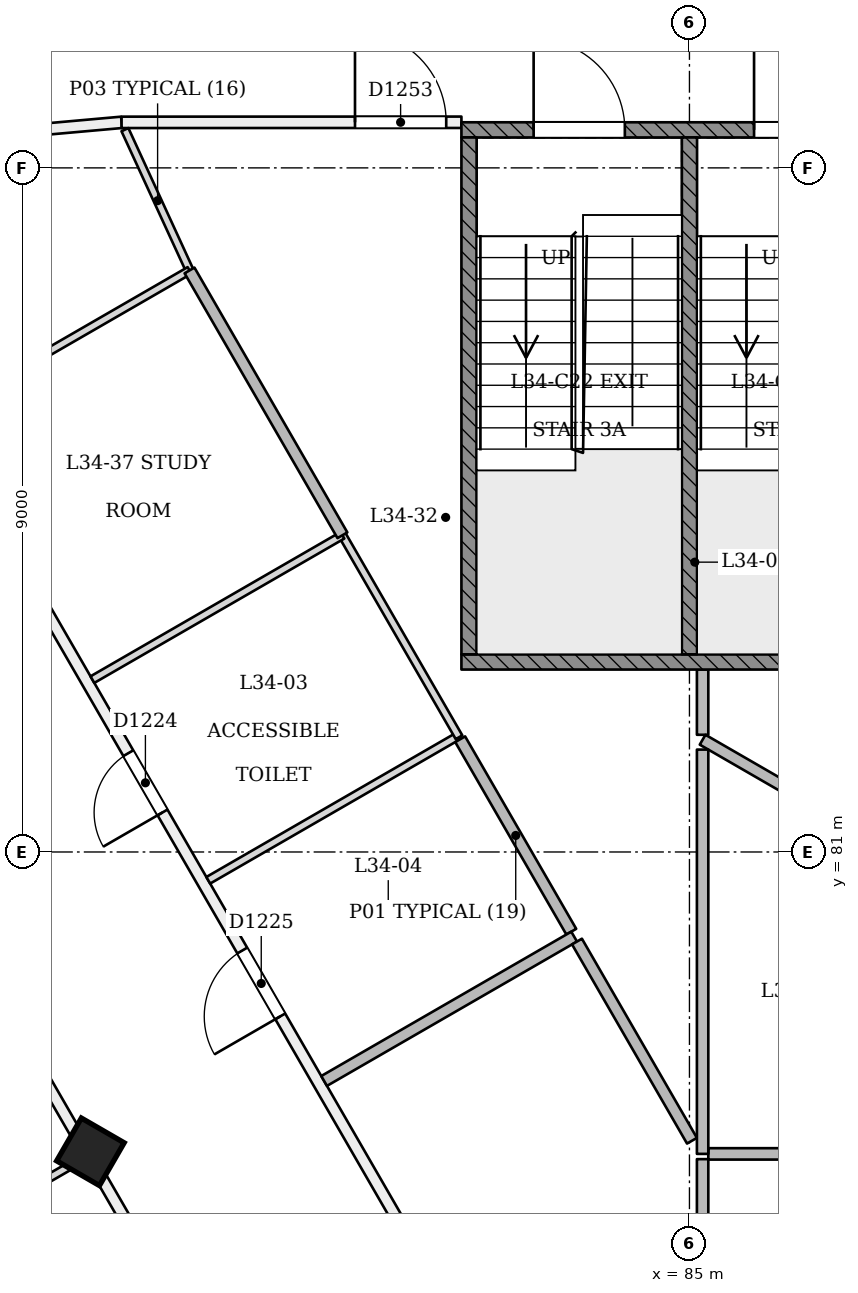
"""IFC4 building model, lengths in metres.
Left out: names, types, materials, properties, quantities, classifications, styles, units other than length and angle.
Written with IfcOpenShell. Run it as: python <this file> out.ifc"""

import sys

from ifc_helpers import new_model, si_unit, direction, frame, frame_2d, origin, origin_2d, place, context, subcontext, project, spatial, rectangle, extrude, element, fill, save


model = new_model("IFC4")
c1 = context("Model", 3, precision=1e-05, world=origin(), true_north=direction((0.0, 1.0)))
c2 = subcontext(c1, "Body", "Model", "MODEL_VIEW")
j1 = project(units=[si_unit("LENGTHUNIT", "METRE"), si_unit("PLANEANGLEUNIT", "RADIAN")], contexts=[c1])
p1 = place(None, origin())
s1 = spatial("IfcSite", under=j1, at=p1, CompositionType="ELEMENT")
p2 = place(p1, origin())
s2 = spatial("IfcBuilding", under=s1, at=p2, CompositionType="ELEMENT")
p3 = place(p2, frame((0.0, 0.0, 135.0)))
s3 = spatial("IfcBuildingStorey", under=s2, at=p3, CompositionType="ELEMENT", Elevation=135.0)
p4 = place(p3, frame((77.092, 77.009, -0.02), z_axis=(0.022221406801, 0.038413224561, 0.999014831351), x_axis=(-0.866021380218, -0.498527772566, 0.0384321348)))
e1 = element("IfcColumn", 1, at=p4, inside=s3, PredefinedType="COLUMN", context=c2, shape_type="SweptSolid", body=[
    extrude(rectangle(XDim=0.65, YDim=0.65, at=origin_2d()), origin(), (0.0, 0.0, 1.0), 3.604),
])
p5 = place(p3, frame((73.173, 90.21, 0.0), z_axis=(0.0, 0.0, 1.0), x_axis=(0.996042384303, 0.088879517729, 0.0)))
e2 = element("IfcWall", 2, at=p5, inside=s3, PredefinedType="PARTITIONING", context=c2, shape_type="SweptSolid", body=[
    extrude(rectangle(XDim=4.373, YDim=0.15, at=frame_2d((2.187, 0.0))), origin(), (0.0, 0.0, 1.0), 3.15),
])
p6 = place(p3, frame((96.944, 90.2, 0.0), z_axis=(0.0, 0.0, 1.0), x_axis=(-0.500002955053, -0.866023697677, 0.0)))
e3 = element("IfcWall", 3, at=p6, inside=s3, PredefinedType="PARTITIONING", context=c2, shape_type="SweptSolid", body=[
    extrude(rectangle(XDim=23.758, YDim=0.15, at=frame_2d((11.879, 0.0))), origin(), (0.0, 0.0, 1.0), 3.15),
])
p7 = place(p6, frame((18.181, 0.0, 0.0)))
e4 = element("IfcOpeningElement", 4, at=p7, cuts=e3, PredefinedType="OPENING", context=c2, shape_type="SweptSolid", body=[
    extrude(rectangle(XDim=1.0, YDim=2.1, at=frame_2d((0.5, 1.05))), frame((0.0, 0.085, 0.0), z_axis=(0.0, -1.0, 0.0), x_axis=(1.0, 0.0, 0.0)), (0.0, 0.0, 1.0), 0.171),
])
p8 = place(p6, frame((9.378, 0.0, 0.0)))
e5 = element("IfcOpeningElement", 5, at=p8, cuts=e3, PredefinedType="OPENING", context=c2, shape_type="SweptSolid", body=[
    extrude(rectangle(XDim=1.0, YDim=2.1, at=frame_2d((0.5, 1.05))), frame((0.0, 0.085, 0.0), z_axis=(0.0, -1.0, 0.0), x_axis=(1.0, 0.0, 0.0)), (0.0, 0.0, 1.0), 0.171),
])
p9 = place(p6, frame((13.859, 0.0, 0.0)))
e6 = element("IfcOpeningElement", 6, at=p9, cuts=e3, PredefinedType="OPENING", context=c2, shape_type="SweptSolid", body=[
    extrude(rectangle(XDim=1.0, YDim=2.1, at=frame_2d((0.5, 1.05))), frame((0.0, 0.085, 0.0), z_axis=(0.0, -1.0, 0.0), x_axis=(1.0, 0.0, 0.0)), (0.0, 0.0, 1.0), 0.171),
])
p10 = place(p6, frame((2.845, 0.0, 0.0)))
e7 = element("IfcOpeningElement", 7, at=p10, cuts=e3, PredefinedType="OPENING", context=c2, shape_type="SweptSolid", body=[
    extrude(rectangle(XDim=1.0, YDim=2.1, at=frame_2d((0.5, 1.05))), frame((0.0, 0.085, 0.0), z_axis=(0.0, -1.0, 0.0), x_axis=(1.0, 0.0, 0.0)), (0.0, 0.0, 1.0), 0.171),
])
p11 = place(p3, frame((64.777, 98.34, 0.0), z_axis=(0.0, 0.0, 1.0), x_axis=(0.499997513821, -0.866026839176, 0.0)))
e8 = element("IfcWall", 8, at=p11, inside=s3, PredefinedType="PARTITIONING", context=c2, shape_type="SweptSolid", body=[
    extrude(rectangle(XDim=40.26, YDim=0.15, at=frame_2d((20.13, 0.0))), origin(), (0.0, 0.0, 1.0), 2.75),
])
p12 = place(p11, frame((0.2, 0.0, 0.0)))
e9 = element("IfcOpeningElement", 9, at=p12, cuts=e8, PredefinedType="OPENING", context=c2, shape_type="SweptSolid", body=[
    extrude(rectangle(XDim=1.2, YDim=2.1, at=frame_2d((0.6, 1.05))), frame((0.0, 0.085, 0.0), z_axis=(0.0, -1.0, 0.0), x_axis=(1.0, 0.0, 0.0)), (0.0, 0.0, 1.0), 0.171),
])
p13 = place(p11, frame((9.525, 0.0, 0.0)))
e10 = element("IfcOpeningElement", 10, at=p13, cuts=e8, PredefinedType="OPENING", context=c2, shape_type="SweptSolid", body=[
    extrude(rectangle(XDim=1.0, YDim=2.1, at=frame_2d((0.5, 1.05))), frame((0.0, 0.085, 0.0), z_axis=(0.0, -1.0, 0.0), x_axis=(1.0, 0.0, 0.0)), (0.0, 0.0, 1.0), 0.171),
])
p14 = place(p11, frame((11.735, 0.0, 0.0)))
e11 = element("IfcOpeningElement", 11, at=p14, cuts=e8, PredefinedType="OPENING", context=c2, shape_type="SweptSolid", body=[
    extrude(rectangle(XDim=1.0, YDim=2.1, at=frame_2d((0.5, 1.05))), frame((0.0, 0.085, 0.0), z_axis=(0.0, -1.0, 0.0), x_axis=(1.0, 0.0, 0.0)), (0.0, 0.0, 1.0), 0.171),
])
p15 = place(p11, frame((19.53, 0.0, 0.0)))
e12 = element("IfcOpeningElement", 12, at=p15, cuts=e8, PredefinedType="OPENING", context=c2, shape_type="SweptSolid", body=[
    extrude(rectangle(XDim=1.2, YDim=2.1, at=frame_2d((0.6, 1.05))), frame((0.0, 0.085, 0.0), z_axis=(0.0, -1.0, 0.0), x_axis=(1.0, 0.0, 0.0)), (0.0, 0.0, 1.0), 0.171),
])
p16 = place(p11, frame((27.41, 0.0, 0.0)))
e13 = element("IfcOpeningElement", 13, at=p16, cuts=e8, PredefinedType="OPENING", context=c2, shape_type="SweptSolid", body=[
    extrude(rectangle(XDim=1.0, YDim=2.1, at=frame_2d((0.5, 1.05))), frame((0.0, 0.085, 0.0), z_axis=(0.0, -1.0, 0.0), x_axis=(1.0, 0.0, 0.0)), (0.0, 0.0, 1.0), 0.171),
])
p17 = place(p11, frame((34.13, 0.0, 0.0)))
e14 = element("IfcOpeningElement", 14, at=p17, cuts=e8, PredefinedType="OPENING", context=c2, shape_type="SweptSolid", body=[
    extrude(rectangle(XDim=1.2, YDim=2.1, at=frame_2d((0.6, 1.05))), frame((0.0, 0.085, 0.0), z_axis=(0.0, -1.0, 0.0), x_axis=(1.0, 0.0, 0.0)), (0.0, 0.0, 1.0), 0.171),
])
p18 = place(p11, frame((38.78, 0.0, 0.0)))
e15 = element("IfcOpeningElement", 15, at=p18, cuts=e8, PredefinedType="OPENING", context=c2, shape_type="SweptSolid", body=[
    extrude(rectangle(XDim=1.0, YDim=2.1, at=frame_2d((0.5, 1.05))), frame((0.0, 0.085, 0.0), z_axis=(0.0, -1.0, 0.0), x_axis=(1.0, 0.0, 0.0)), (0.0, 0.0, 1.0), 0.171),
])
p19 = place(p3, frame((85.093, 63.473, 0.0), z_axis=(0.0, 0.0, 1.0), x_axis=(0.499997513821, 0.866026839176, 0.0)))
e16 = element("IfcWall", 16, at=p19, inside=s3, PredefinedType="PARTITIONING", context=c2, shape_type="SweptSolid", body=[
    extrude(rectangle(XDim=40.26, YDim=0.15, at=frame_2d((20.13, 0.0))), origin(), (0.0, 0.0, 1.0), 2.75),
])
p20 = place(p19, frame((0.429, 0.0, 0.0)))
e17 = element("IfcOpeningElement", 17, at=p20, cuts=e16, PredefinedType="OPENING", context=c2, shape_type="SweptSolid", body=[
    extrude(rectangle(XDim=1.2, YDim=2.1, at=frame_2d((0.6, 1.05))), frame((0.0, 0.085, 0.0), z_axis=(0.0, -1.0, 0.0), x_axis=(1.0, 0.0, 0.0)), (0.0, 0.0, 1.0), 0.171),
])
p21 = place(p19, frame((2.85, 0.0, 0.0)))
e18 = element("IfcOpeningElement", 18, at=p21, cuts=e16, PredefinedType="OPENING", context=c2, shape_type="SweptSolid", body=[
    extrude(rectangle(XDim=1.0, YDim=2.1, at=frame_2d((0.5, 1.05))), frame((0.0, 0.085, 0.0), z_axis=(0.0, -1.0, 0.0), x_axis=(1.0, 0.0, 0.0)), (0.0, 0.0, 1.0), 0.171),
])
p22 = place(p19, frame((8.28, 0.0, 0.0)))
e19 = element("IfcOpeningElement", 19, at=p22, cuts=e16, PredefinedType="OPENING", context=c2, shape_type="SweptSolid", body=[
    extrude(rectangle(XDim=1.2, YDim=2.1, at=frame_2d((0.6, 1.05))), frame((0.0, 0.085, 0.0), z_axis=(0.0, -1.0, 0.0), x_axis=(1.0, 0.0, 0.0)), (0.0, 0.0, 1.0), 0.171),
])
p23 = place(p19, frame((11.735, 0.0, 0.0)))
e20 = element("IfcOpeningElement", 20, at=p23, cuts=e16, PredefinedType="OPENING", context=c2, shape_type="SweptSolid", body=[
    extrude(rectangle(XDim=1.0, YDim=2.1, at=frame_2d((0.5, 1.05))), frame((0.0, 0.085, 0.0), z_axis=(0.0, -1.0, 0.0), x_axis=(1.0, 0.0, 0.0)), (0.0, 0.0, 1.0), 0.171),
])
p24 = place(p19, frame((18.41, 0.0, 0.0)))
e21 = element("IfcOpeningElement", 21, at=p24, cuts=e16, PredefinedType="OPENING", context=c2, shape_type="SweptSolid", body=[
    extrude(rectangle(XDim=1.0, YDim=2.1, at=frame_2d((0.5, 1.05))), frame((0.0, 0.085, 0.0), z_axis=(0.0, -1.0, 0.0), x_axis=(1.0, 0.0, 0.0)), (0.0, 0.0, 1.0), 0.171),
])
p25 = place(p19, frame((20.85, 0.0, 0.0)))
e22 = element("IfcOpeningElement", 22, at=p25, cuts=e16, PredefinedType="OPENING", context=c2, shape_type="SweptSolid", body=[
    extrude(rectangle(XDim=1.0, YDim=2.1, at=frame_2d((0.5, 1.05))), frame((0.0, 0.085, 0.0), z_axis=(0.0, -1.0, 0.0), x_axis=(1.0, 0.0, 0.0)), (0.0, 0.0, 1.0), 0.171),
])
p26 = place(p19, frame((26.38, 0.0, 0.0)))
e23 = element("IfcOpeningElement", 23, at=p26, cuts=e16, PredefinedType="OPENING", context=c2, shape_type="SweptSolid", body=[
    extrude(rectangle(XDim=1.0, YDim=2.1, at=frame_2d((0.5, 1.05))), frame((0.0, 0.085, 0.0), z_axis=(0.0, -1.0, 0.0), x_axis=(1.0, 0.0, 0.0)), (0.0, 0.0, 1.0), 0.171),
])
p27 = place(p19, frame((34.13, 0.0, 0.0)))
e24 = element("IfcOpeningElement", 24, at=p27, cuts=e16, PredefinedType="OPENING", context=c2, shape_type="SweptSolid", body=[
    extrude(rectangle(XDim=1.2, YDim=2.1, at=frame_2d((0.6, 1.05))), frame((0.0, 0.085, 0.0), z_axis=(0.0, -1.0, 0.0), x_axis=(1.0, 0.0, 0.0)), (0.0, 0.0, 1.0), 0.171),
])
p28 = place(p19, frame((38.86, 0.0, 0.0)))
e25 = element("IfcOpeningElement", 25, at=p28, cuts=e16, PredefinedType="OPENING", context=c2, shape_type="SweptSolid", body=[
    extrude(rectangle(XDim=1.2, YDim=2.1, at=frame_2d((0.6, 1.05))), frame((0.0, 0.085, 0.0), z_axis=(0.0, -1.0, 0.0), x_axis=(1.0, 0.0, 0.0)), (0.0, 0.0, 1.0), 0.171),
])
p29 = place(p3, frame((77.529, 90.599, 0.0), z_axis=(0.0, 0.0, 1.0), x_axis=(0.999999976145, 0.000218424065, 0.0)))
e26 = element("IfcWall", 26, at=p29, inside=s3, PredefinedType="PARTITIONING", context=c2, shape_type="SweptSolid", body=[
    extrude(rectangle(XDim=4.471, YDim=0.15, at=frame_2d((2.235, 0.0))), origin(), (0.0, 0.0, 1.0), 3.15),
])
p30 = place(p29, frame((3.071, 0.0, 0.0)))
e27 = element("IfcOpeningElement", 27, at=p30, cuts=e26, PredefinedType="OPENING", context=c2, shape_type="SweptSolid", body=[
    extrude(rectangle(XDim=1.2, YDim=2.1, at=frame_2d((0.6, 1.05))), frame((0.0, 0.085, 0.0), z_axis=(0.0, -1.0, 0.0), x_axis=(1.0, 0.0, 0.0)), (0.0, 0.0, 1.0), 0.171),
])
p31 = place(p3, frame((85.0, 69.513, 0.0), z_axis=(0.0, 0.0, 1.0), x_axis=(-0.500001724231, 0.866024408297, 0.0)))
e28 = element("IfcWall", 28, at=p31, inside=s3, PredefinedType="PARTITIONING", context=c2, shape_type="SweptSolid", body=[
    extrude(rectangle(XDim=23.888, YDim=0.15, at=frame_2d((11.944, 0.0))), origin(), (0.0, 0.0, 1.0), 3.15),
])
p32 = place(p31, frame((21.016, 0.0, 0.0)))
e29 = element("IfcOpeningElement", 29, at=p32, cuts=e28, PredefinedType="OPENING", context=c2, shape_type="SweptSolid", body=[
    extrude(rectangle(XDim=0.9, YDim=2.1, at=frame_2d((0.45, 1.05))), frame((0.0, 0.085, 0.0), z_axis=(0.0, -1.0, 0.0), x_axis=(1.0, 0.0, 0.0)), (0.0, 0.0, 1.0), 0.171),
])
p33 = place(p31, frame((13.865, 0.0, 0.0)))
e30 = element("IfcOpeningElement", 30, at=p33, cuts=e28, PredefinedType="OPENING", context=c2, shape_type="SweptSolid", body=[
    extrude(rectangle(XDim=0.9, YDim=2.1, at=frame_2d((0.45, 1.05))), frame((0.0, 0.085, 0.0), z_axis=(0.0, -1.0, 0.0), x_axis=(1.0, 0.0, 0.0)), (0.0, 0.0, 1.0), 0.171),
])
p34 = place(p31, frame((10.767, 0.0, 0.0)))
e31 = element("IfcOpeningElement", 31, at=p34, cuts=e28, PredefinedType="OPENING", context=c2, shape_type="SweptSolid", body=[
    extrude(rectangle(XDim=1.0, YDim=2.1, at=frame_2d((0.5, 1.05))), frame((0.0, 0.085, 0.0), z_axis=(0.0, -1.0, 0.0), x_axis=(1.0, 0.0, 0.0)), (0.0, 0.0, 1.0), 0.171),
])
p35 = place(p31, frame((5.609, 0.0, 0.0)))
e32 = element("IfcOpeningElement", 32, at=p35, cuts=e28, PredefinedType="OPENING", context=c2, shape_type="SweptSolid", body=[
    extrude(rectangle(XDim=1.0, YDim=2.1, at=frame_2d((0.5, 1.05))), frame((0.0, 0.085, 0.0), z_axis=(0.0, -1.0, 0.0), x_axis=(1.0, 0.0, 0.0)), (0.0, 0.0, 1.0), 0.171),
])
p36 = place(p31, frame((17.351, 0.0, 0.0)))
e33 = element("IfcOpeningElement", 33, at=p36, cuts=e28, PredefinedType="OPENING", context=c2, shape_type="SweptSolid", body=[
    extrude(rectangle(XDim=1.0, YDim=2.1, at=frame_2d((0.5, 1.05))), frame((0.0, 0.085, 0.0), z_axis=(0.0, -1.0, 0.0), x_axis=(1.0, 0.0, 0.0)), (0.0, 0.0, 1.0), 0.171),
])
p37 = place(p3, frame((78.433, 88.634, 0.0), z_axis=(0.0, 0.0, 1.0), x_axis=(-0.4178390232, 0.908521078837, 0.0)))
e34 = element("IfcWall", 34, at=p37, inside=s3, PredefinedType="PARTITIONING", context=c2, shape_type="SweptSolid", body=[
    extrude(rectangle(XDim=2.058, YDim=0.1, at=frame_2d((1.029, 0.0))), origin(), (0.0, 0.0, 1.0), 3.15),
])
p38 = place(p3, frame((75.134, 86.752, 0.0), z_axis=(0.0, 0.0, 1.0), x_axis=(0.866015388607, 0.500017346395, 0.0)))
e35 = element("IfcWall", 35, at=p38, inside=s3, PredefinedType="PARTITIONING", context=c2, shape_type="SweptSolid", body=[
    extrude(rectangle(XDim=3.798, YDim=0.1, at=frame_2d((1.899, 0.0))), origin(), (0.0, 0.0, 1.0), 3.15),
])
p39 = place(p3, frame((78.669, 80.628, 0.0), z_axis=(0.0, 0.0, 1.0), x_axis=(0.866027152591, 0.499996970966, 0.0)))
e36 = element("IfcWall", 36, at=p39, inside=s3, PredefinedType="PARTITIONING", context=c2, shape_type="SweptSolid", body=[
    extrude(rectangle(XDim=3.798, YDim=0.1, at=frame_2d((1.899, 0.0))), origin(), (0.0, 0.0, 1.0), 3.15),
])
p40 = place(p3, frame((81.969, 82.509, 0.0), z_axis=(0.0, 0.0, 1.0), x_axis=(-0.499973348067, 0.866040790738, 0.0)))
e37 = element("IfcWall", 37, at=p40, inside=s3, PredefinedType="PARTITIONING", context=c2, shape_type="SweptSolid", body=[
    extrude(rectangle(XDim=3.089, YDim=0.1, at=frame_2d((1.544, 0.0))), origin(), (0.0, 0.0, 1.0), 3.15),
])
p41 = place(p3, frame((80.434, 85.167, 0.0), z_axis=(0.0, 0.0, 1.0), x_axis=(-0.865999316689, -0.500045181452, 0.0)))
e38 = element("IfcWall", 38, at=p41, inside=s3, PredefinedType="PARTITIONING", context=c2, shape_type="SweptSolid", body=[
    extrude(rectangle(XDim=3.798, YDim=0.1, at=frame_2d((1.899, 0.0))), origin(), (0.0, 0.0, 1.0), 3.15),
])
p42 = place(p3, frame((83.445, 79.952, 0.0), z_axis=(0.0, 0.0, 1.0), x_axis=(-0.499992340283, 0.866029826079, 0.0)))
e39 = element("IfcWall", 39, at=p42, inside=s3, PredefinedType="PARTITIONING", context=c2, shape_type="SweptSolid", body=[
    extrude(rectangle(XDim=2.923, YDim=0.15, at=frame_2d((1.462, 0.0))), origin(), (0.0, 0.0, 1.0), 3.15),
])
p43 = place(p3, frame((80.194, 77.988, 0.0), z_axis=(0.0, 0.0, 1.0), x_axis=(0.866015388607, 0.500017346395, 0.0)))
e40 = element("IfcWall", 40, at=p43, inside=s3, PredefinedType="PARTITIONING", context=c2, shape_type="SweptSolid", body=[
    extrude(rectangle(XDim=3.798, YDim=0.15, at=frame_2d((1.899, 0.0))), origin(), (0.0, 0.0, 1.0), 3.15),
])
p44 = place(p3, frame((85.173, 76.959, 0.0), z_axis=(0.0, 0.0, 1.0), x_axis=(0.0, -1.0, 0.0)))
e41 = element("IfcWall", 41, at=p44, inside=s3, PredefinedType="PARTITIONING", context=c2, shape_type="SweptSolid", body=[
    extrude(rectangle(XDim=6.866, YDim=0.15, at=frame_2d((3.433, 0.0))), origin(), (0.0, 0.0, 1.0), 3.15),
])
p45 = place(p3, frame((89.209, 77.028, 0.0), z_axis=(0.0, 0.0, 1.0), x_axis=(-1.0, 0.0, 0.0)))
e42 = element("IfcWall", 42, at=p45, inside=s3, PredefinedType="PARTITIONING", context=c2, shape_type="SweptSolid", body=[
    extrude(rectangle(XDim=3.961, YDim=0.15, at=frame_2d((1.98, 0.0))), origin(), (0.0, 0.0, 1.0), 3.15),
])
p46 = place(p3, frame((71.55, 73.809, 0.0), z_axis=(0.0, 0.0, 1.0), x_axis=(0.866032601554, 0.49998753289, 0.0)))
e43 = element("IfcWall", 43, at=p46, inside=s3, PredefinedType="PARTITIONING", context=c2, shape_type="SweptSolid", body=[
    extrude(rectangle(XDim=6.325, YDim=0.1, at=frame_2d((3.163, 0.0))), origin(), (0.0, 0.0, 1.0), 2.65),
])
p47 = place(p3, frame((85.173, 83.4, 0.0), z_axis=(0.0, 0.0, 1.0), x_axis=(0.0, -1.0, 0.0)))
e44 = element("IfcWall", 44, at=p47, inside=s3, PredefinedType="PARTITIONING", context=c2, shape_type="SweptSolid", body=[
    extrude(rectangle(XDim=0.858, YDim=0.15, at=frame_2d((0.429, 0.0))), origin(), (0.0, 0.0, 1.0), 3.15),
])
p48 = place(p3, frame((85.173, 82.477, 0.0), z_axis=(0.0, 0.0, 1.0), x_axis=(0.866040044389, -0.499974640872, 0.0)))
e45 = element("IfcWall", 45, at=p48, inside=s3, PredefinedType="PARTITIONING", context=c2, shape_type="SweptSolid", body=[
    extrude(rectangle(XDim=6.257, YDim=0.15, at=frame_2d((3.128, 0.0))), origin(), (0.0, 0.0, 1.0), 3.15),
])
p49 = place(p3, frame((83.52, 79.822, 0.0), z_axis=(0.0, 0.0, 1.0), x_axis=(0.500018127915, -0.866014937375, 0.0)))
e46 = element("IfcWall", 46, at=p49, inside=s3, PredefinedType="PARTITIONING", context=c2, shape_type="SweptSolid", body=[
    extrude(rectangle(XDim=3.026, YDim=0.15, at=frame_2d((1.513, 0.0))), origin(), (0.0, 0.0, 1.0), 3.15),
])
p50 = place(p3, frame((85.173, 77.028, 0.0), z_axis=(0.0, 0.0, 1.0), x_axis=(0.0, 1.0, 0.0)))
e47 = element("IfcWall", 47, at=p50, inside=s3, PredefinedType="PARTITIONING", context=c2, shape_type="SweptSolid", body=[
    extrude(rectangle(XDim=5.319, YDim=0.15, at=frame_2d((2.659, 0.0))), origin(), (0.0, 0.0, 1.0), 3.15),
])
p51 = place(p3, frame((78.423, 88.651, 0.0), z_axis=(0.0, 0.0, 1.0), x_axis=(0.499983355923, -0.866035013033, 0.0)))
e48 = element("IfcWall", 48, at=p51, inside=s3, PredefinedType="PARTITIONING", context=c2, shape_type="SweptSolid", body=[
    extrude(rectangle(XDim=4.023, YDim=0.15, at=frame_2d((2.012, 0.0))), origin(), (0.0, 0.0, 1.0), 3.15),
])
p52 = place(p3, frame((82.0, 90.5, 0.0), z_axis=(0.0, 0.0, 1.0), x_axis=(1.0, 0.0, 0.0)))
e49 = element("IfcWall", 49, at=p52, inside=s3, PredefinedType="SOLIDWALL", context=c2, shape_type="SweptSolid", body=[
    extrude(rectangle(XDim=6.0, YDim=0.2, at=frame_2d((3.0, 0.0))), origin(), (0.0, 0.0, 1.0), 3.15),
])
p53 = place(p52, frame((0.95, 0.0, 0.0)))
e50 = element("IfcOpeningElement", 50, at=p53, cuts=e49, PredefinedType="OPENING", context=c2, shape_type="SweptSolid", body=[
    extrude(rectangle(XDim=1.2, YDim=2.1, at=frame_2d((0.6, 1.05))), frame((0.0, 0.11, 0.0), z_axis=(0.0, -1.0, 0.0), x_axis=(1.0, 0.0, 0.0)), (0.0, 0.0, 1.0), 0.221),
])
p54 = place(p52, frame((3.85, 0.0, 0.0)))
e51 = element("IfcOpeningElement", 51, at=p54, cuts=e49, PredefinedType="OPENING", context=c2, shape_type="SweptSolid", body=[
    extrude(rectangle(XDim=1.2, YDim=2.1, at=frame_2d((0.6, 1.05))), frame((0.0, 0.11, 0.0), z_axis=(0.0, -1.0, 0.0), x_axis=(1.0, 0.0, 0.0)), (0.0, 0.0, 1.0), 0.221),
])
p55 = place(p3, frame((82.0, 83.5, 0.0), z_axis=(0.0, 0.0, 1.0), x_axis=(1.0, 0.0, 0.0)))
e52 = element("IfcWall", 52, at=p55, inside=s3, PredefinedType="SOLIDWALL", context=c2, shape_type="SweptSolid", body=[
    extrude(rectangle(XDim=6.0, YDim=0.2, at=frame_2d((3.0, 0.0))), origin(), (0.0, 0.0, 1.0), 3.15),
])
for number, where, z_axis, x_axis in (
    (53, (82.1, 83.6, 0.0), (0.0, 0.0, 1.0), (0.0, 1.0, 0.0)),
    (54, (85.0, 83.6, 0.0), (0.0, 0.0, 1.0), (0.0, 1.0, 0.0)),
):
    element("IfcWall", number, at=place(p3, frame(where, z_axis=z_axis, x_axis=x_axis)), inside=s3, PredefinedType="SOLIDWALL", context=c2, shape_type="SweptSolid", body=[
        extrude(rectangle(XDim=6.8, YDim=0.2, at=frame_2d((3.4, 0.0))), origin(), (0.0, 0.0, 1.0), 3.15),
    ])
p56 = place(p33, origin())
e55 = element("IfcDoor", 55, at=p56, inside=s3, OperationType="SINGLE_SWING_LEFT", PredefinedType="NOTDEFINED", context=c2, shape_type="SweptSolid", body=[
    extrude(rectangle(XDim=0.9, YDim=2.1, at=frame_2d((0.45, 1.05))), frame((0.0, 0.025, 0.0), z_axis=(0.0, -1.0, 0.0), x_axis=(1.0, 0.0, 0.0)), (0.0, 0.0, 1.0), 0.05),
])
fill(e30, e55)
p57 = place(p34, origin())
e56 = element("IfcDoor", 56, at=p57, inside=s3, OperationType="SINGLE_SWING_LEFT", PredefinedType="NOTDEFINED", context=c2, shape_type="SweptSolid", body=[
    extrude(rectangle(XDim=1.0, YDim=2.1, at=frame_2d((0.5, 1.05))), frame((0.0, 0.025, 0.0), z_axis=(0.0, -1.0, 0.0), x_axis=(1.0, 0.0, 0.0)), (0.0, 0.0, 1.0), 0.05),
])
fill(e31, e56)
p58 = place(p30, origin())
e57 = element("IfcDoor", 57, at=p58, inside=s3, OperationType="SINGLE_SWING_LEFT", PredefinedType="NOTDEFINED", context=c2, shape_type="SweptSolid", body=[
    extrude(rectangle(XDim=1.2, YDim=2.1, at=frame_2d((0.6, 1.05))), frame((0.0, 0.025, 0.0), z_axis=(0.0, -1.0, 0.0), x_axis=(1.0, 0.0, 0.0)), (0.0, 0.0, 1.0), 0.05),
])
fill(e27, e57)
p59 = place(p53, origin())
e58 = element("IfcDoor", 58, at=p59, inside=s3, OperationType="SINGLE_SWING_LEFT", PredefinedType="NOTDEFINED", context=c2, shape_type="SweptSolid", body=[
    extrude(rectangle(XDim=1.2, YDim=2.1, at=frame_2d((0.6, 1.05))), frame((0.0, 0.025, 0.0), z_axis=(0.0, -1.0, 0.0), x_axis=(1.0, 0.0, 0.0)), (0.0, 0.0, 1.0), 0.05),
])
fill(e50, e58)
p60 = place(p54, origin())
e59 = element("IfcDoor", 59, at=p60, inside=s3, OperationType="SINGLE_SWING_LEFT", PredefinedType="NOTDEFINED", context=c2, shape_type="SweptSolid", body=[
    extrude(rectangle(XDim=1.2, YDim=2.1, at=frame_2d((0.6, 1.05))), frame((0.0, 0.025, 0.0), z_axis=(0.0, -1.0, 0.0), x_axis=(1.0, 0.0, 0.0)), (0.0, 0.0, 1.0), 0.05),
])
fill(e51, e59)
save(model, sys.argv[1])
